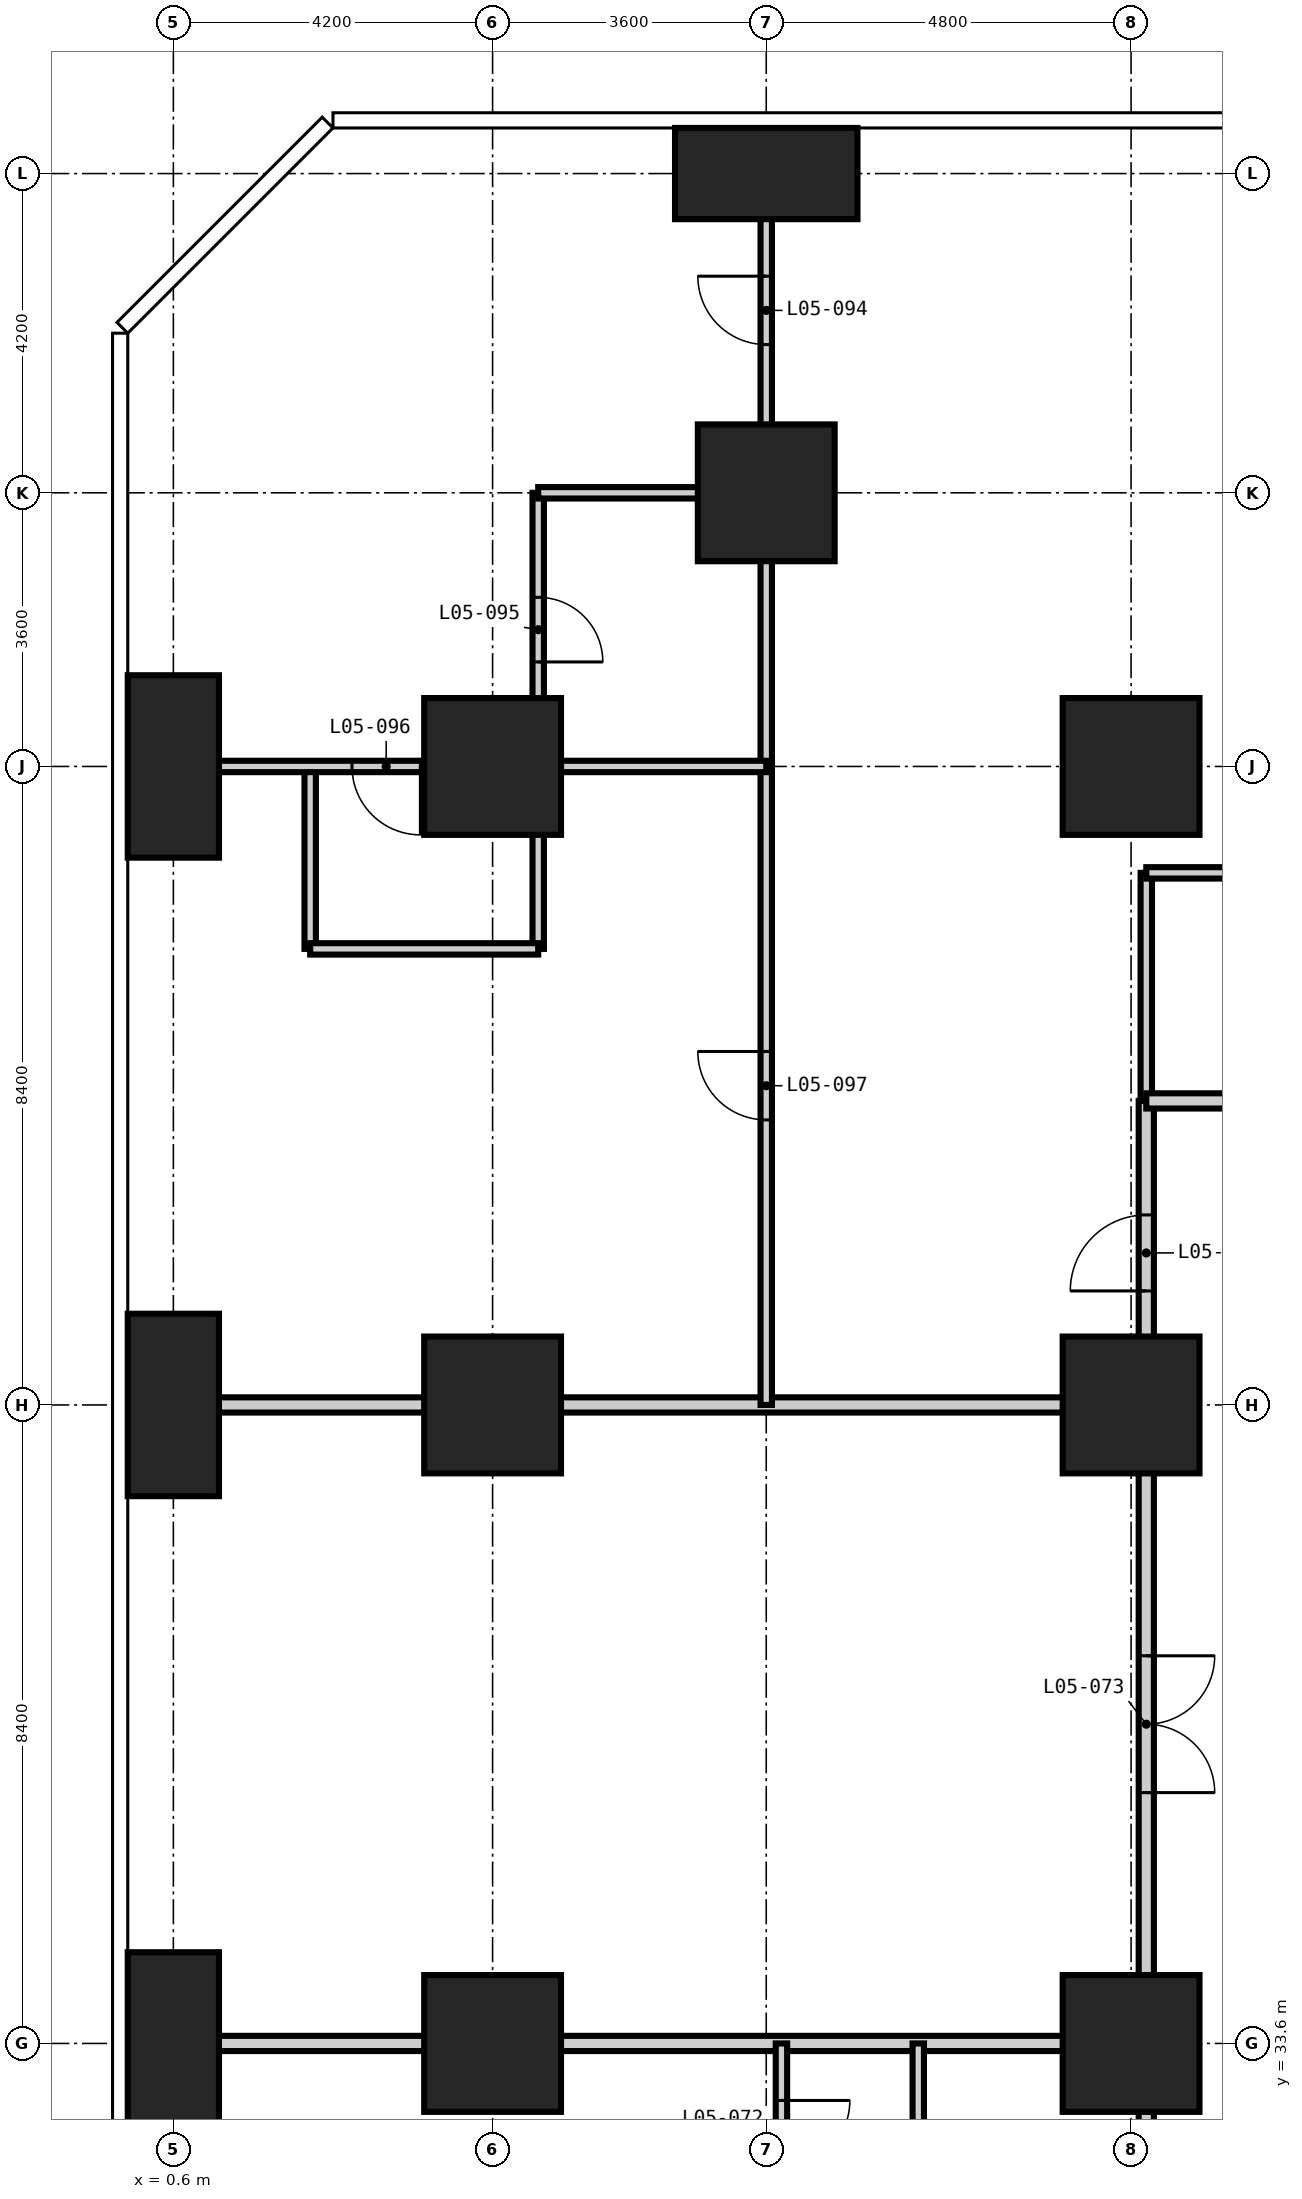
"""IFC4 building model, lengths in metres.
Left out: names, types, materials, properties, quantities, classifications, styles, units other than length and angle.
Written with IfcOpenShell. Run it as: python <this file> out.ifc"""

import sys

from ifc_helpers import new_model, si_unit, direction, frame, frame_2d, origin, origin_2d, place, context, subcontext, project, spatial, rectangle, extrude, element, fill, save


model = new_model("IFC4")
c1 = context("Model", 3, precision=1e-05, world=origin(), true_north=direction((0.0, 1.0)))
c2 = subcontext(c1, "Body", "Model", "MODEL_VIEW")
j1 = project(units=[si_unit("LENGTHUNIT", "METRE"), si_unit("PLANEANGLEUNIT", "RADIAN")], contexts=[c1])
p1 = place(None, origin())
s1 = spatial("IfcSite", under=j1, at=p1, CompositionType="ELEMENT")
p2 = place(p1, origin())
s2 = spatial("IfcBuilding", under=s1, at=p2, CompositionType="ELEMENT")
p3 = place(p2, frame((0.0, 0.0, 27.0)))
s3 = spatial("IfcBuildingStorey", under=s2, at=p3, CompositionType="ELEMENT", Elevation=27.0)
for number, where, z_axis, x_axis in (
    (1, (0.6, 33.6, -0.35), (0.0, 0.0, 1.0), (1.0, 0.0, 0.0)),
    (2, (0.6, 42.0, -0.35), (0.0, 0.0, 1.0), (1.0, 0.0, 0.0)),
    (3, (0.6, 50.4, -0.35), (0.0, 0.0, 1.0), (1.0, 0.0, 0.0)),
):
    element("IfcColumn", number, at=place(p3, frame(where, z_axis=z_axis, x_axis=x_axis)), inside=s3, PredefinedType="COLUMN", context=c2, shape_type="SweptSolid", body=[
        extrude(rectangle(XDim=1.2, YDim=2.4, at=origin_2d()), origin(), (0.0, 0.0, 1.0), 3.6),
    ])
for number, where, z_axis, x_axis in (
    (4, (4.8, 33.6, -0.35), (0.0, 0.0, 1.0), (1.0, 0.0, 0.0)),
    (5, (4.8, 42.0, -0.35), (0.0, 0.0, 1.0), (1.0, 0.0, 0.0)),
    (6, (4.8, 50.4, -0.35), (0.0, 0.0, 1.0), (1.0, 0.0, 0.0)),
    (7, (8.4, 54.0, -0.35), (0.0, 0.0, 1.0), (1.0, 0.0, 0.0)),
):
    element("IfcColumn", number, at=place(p3, frame(where, z_axis=z_axis, x_axis=x_axis)), inside=s3, PredefinedType="COLUMN", context=c2, shape_type="SweptSolid", body=[
        extrude(rectangle(XDim=1.8, YDim=1.8, at=origin_2d()), origin(), (0.0, 0.0, 1.0), 3.6),
    ])
p4 = place(p3, frame((8.4, 58.2, -0.35), z_axis=(0.0, 0.0, 1.0), x_axis=(1.0, 0.0, 0.0)))
e8 = element("IfcColumn", 8, at=p4, inside=s3, PredefinedType="COLUMN", context=c2, shape_type="SweptSolid", body=[
    extrude(rectangle(XDim=2.4, YDim=1.2, at=origin_2d()), origin(), (0.0, 0.0, 1.0), 3.6),
])
for number, where, z_axis, x_axis in (
    (9, (13.2, 33.6, -0.35), (0.0, 0.0, 1.0), (1.0, 0.0, 0.0)),
    (10, (13.2, 42.0, -0.35), (0.0, 0.0, 1.0), (1.0, 0.0, 0.0)),
    (11, (13.2, 50.4, -0.35), (0.0, 0.0, 1.0), (1.0, 0.0, 0.0)),
):
    element("IfcColumn", number, at=place(p3, frame(where, z_axis=z_axis, x_axis=x_axis)), inside=s3, PredefinedType="COLUMN", context=c2, shape_type="SweptSolid", body=[
        extrude(rectangle(XDim=1.8, YDim=1.8, at=origin_2d()), origin(), (0.0, 0.0, 1.0), 3.6),
    ])
p5 = place(p3, frame((5.4, 50.4, 0.0), z_axis=(0.0, 0.0, 1.0), x_axis=(0.0, 1.0, 0.0)))
e12 = element("IfcWall", 12, at=p5, inside=s3, PredefinedType="PARTITIONING", context=c2, shape_type="SweptSolid", body=[
    extrude(rectangle(XDim=3.6, YDim=0.15, at=frame_2d((1.8, 0.0))), origin(), (0.0, 0.0, 1.0), 3.25),
])
p6 = place(p5, frame((1.375, 0.0, 0.0)))
e13 = element("IfcOpeningElement", 13, at=p6, cuts=e12, PredefinedType="OPENING", context=c2, shape_type="SweptSolid", body=[
    extrude(rectangle(XDim=0.85, YDim=2.1, at=frame_2d((0.425, 1.05))), frame((0.0, 0.085, 0.0), z_axis=(0.0, -1.0, 0.0), x_axis=(1.0, 0.0, 0.0)), (0.0, 0.0, 1.0), 0.17),
])
p7 = place(p3, frame((13.4, 46.0, 0.0), z_axis=(0.0, 0.0, 1.0), x_axis=(0.0, 1.0, 0.0)))
e14 = element("IfcWall", 14, at=p7, inside=s3, PredefinedType="PARTITIONING", context=c2, shape_type="SweptSolid", body=[
    extrude(rectangle(XDim=3.0, YDim=0.15, at=frame_2d((1.5, 0.0))), origin(), (0.0, 0.0, 1.0), 3.25),
])
p8 = place(p3, frame((13.4, 49.0, 0.0), z_axis=(0.0, 0.0, 1.0), x_axis=(1.0, 0.0, 0.0)))
e15 = element("IfcWall", 15, at=p8, inside=s3, PredefinedType="PARTITIONING", context=c2, shape_type="SweptSolid", body=[
    extrude(rectangle(XDim=3.4, YDim=0.15, at=frame_2d((1.7, 0.0))), origin(), (0.0, 0.0, 1.0), 3.25),
])
p9 = place(p8, frame((1.275, 0.0, 0.0)))
e16 = element("IfcOpeningElement", 16, at=p9, cuts=e15, PredefinedType="OPENING", context=c2, shape_type="SweptSolid", body=[
    extrude(rectangle(XDim=0.85, YDim=2.1, at=frame_2d((0.425, 1.05))), frame((0.0, 0.085, 0.0), z_axis=(0.0, -1.0, 0.0), x_axis=(1.0, 0.0, 0.0)), (0.0, 0.0, 1.0), 0.17),
])
p10 = place(p3, frame((5.4, 54.0, 0.0), z_axis=(0.0, 0.0, 1.0), x_axis=(1.0, 0.0, 0.0)))
e17 = element("IfcWall", 17, at=p10, inside=s3, PredefinedType="PARTITIONING", context=c2, shape_type="SweptSolid", body=[
    extrude(rectangle(XDim=3.0, YDim=0.15, at=frame_2d((1.5, 0.0))), origin(), (0.0, 0.0, 1.0), 3.25),
])
p11 = place(p3, frame((13.4, 13.4, 0.0), z_axis=(0.0, 0.0, 1.0), x_axis=(0.0, 1.0, 0.0)))
e18 = element("IfcWall", 18, at=p11, inside=s3, PredefinedType="PARTITIONING", context=c2, shape_type="SweptSolid", body=[
    extrude(rectangle(XDim=20.2, YDim=0.2, at=frame_2d((10.1, 0.0))), origin(), (0.0, 0.0, 1.0), 3.25),
])
p12 = place(p11, frame((6.2, 0.0, 0.0)))
e19 = element("IfcOpeningElement", 19, at=p12, cuts=e18, PredefinedType="OPENING", context=c2, shape_type="SweptSolid", body=[
    extrude(rectangle(XDim=1.0, YDim=2.2, at=frame_2d((0.5, 1.1))), frame((0.0, 0.11, 0.0), z_axis=(0.0, -1.0, 0.0), x_axis=(1.0, 0.0, 0.0)), (0.0, 0.0, 1.0), 0.22),
])
p13 = place(p11, frame((8.0, 0.0, 0.0)))
e20 = element("IfcOpeningElement", 20, at=p13, cuts=e18, PredefinedType="OPENING", context=c2, shape_type="SweptSolid", body=[
    extrude(rectangle(XDim=1.0, YDim=2.2, at=frame_2d((0.5, 1.1))), frame((0.0, 0.11, 0.0), z_axis=(0.0, -1.0, 0.0), x_axis=(1.0, 0.0, 0.0)), (0.0, 0.0, 1.0), 0.22),
])
p14 = place(p11, frame((14.6, 0.0, 0.0)))
e21 = element("IfcOpeningElement", 21, at=p14, cuts=e18, PredefinedType="OPENING", context=c2, shape_type="SweptSolid", body=[
    extrude(rectangle(XDim=1.0, YDim=2.2, at=frame_2d((0.5, 1.1))), frame((0.0, 0.11, 0.0), z_axis=(0.0, -1.0, 0.0), x_axis=(1.0, 0.0, 0.0)), (0.0, 0.0, 1.0), 0.22),
])
p15 = place(p11, frame((16.4, 0.0, 0.0)))
e22 = element("IfcOpeningElement", 22, at=p15, cuts=e18, PredefinedType="OPENING", context=c2, shape_type="SweptSolid", body=[
    extrude(rectangle(XDim=1.0, YDim=2.2, at=frame_2d((0.5, 1.1))), frame((0.0, 0.11, 0.0), z_axis=(0.0, -1.0, 0.0), x_axis=(1.0, 0.0, 0.0)), (0.0, 0.0, 1.0), 0.22),
])
p16 = place(p11, frame((1.2, 0.0, 0.0)))
e23 = element("IfcOpeningElement", 23, at=p16, cuts=e18, PredefinedType="OPENING", context=c2, shape_type="SweptSolid", body=[
    extrude(rectangle(XDim=1.0, YDim=2.2, at=frame_2d((0.5, 1.1))), frame((0.0, 0.11, 0.0), z_axis=(0.0, -1.0, 0.0), x_axis=(1.0, 0.0, 0.0)), (0.0, 0.0, 1.0), 0.22),
])
p17 = place(p3, frame((13.4, 42.0, 0.0), z_axis=(0.0, 0.0, 1.0), x_axis=(0.0, 1.0, 0.0)))
e24 = element("IfcWall", 24, at=p17, inside=s3, PredefinedType="PARTITIONING", context=c2, shape_type="SweptSolid", body=[
    extrude(rectangle(XDim=4.0, YDim=0.2, at=frame_2d((2.0, 0.0))), origin(), (0.0, 0.0, 1.0), 3.25),
])
p18 = place(p17, frame((1.5, 0.0, 0.0)))
e25 = element("IfcOpeningElement", 25, at=p18, cuts=e24, PredefinedType="OPENING", context=c2, shape_type="SweptSolid", body=[
    extrude(rectangle(XDim=1.0, YDim=2.2, at=frame_2d((0.5, 1.1))), frame((0.0, 0.11, 0.0), z_axis=(0.0, -1.0, 0.0), x_axis=(1.0, 0.0, 0.0)), (0.0, 0.0, 1.0), 0.22),
])
p19 = place(p3, frame((13.4, 46.0, 0.0), z_axis=(0.0, 0.0, 1.0), x_axis=(1.0, 0.0, 0.0)))
e26 = element("IfcWall", 26, at=p19, inside=s3, PredefinedType="PARTITIONING", context=c2, shape_type="SweptSolid", body=[
    extrude(rectangle(XDim=32.3, YDim=0.2, at=frame_2d((16.15, 0.0))), origin(), (0.0, 0.0, 1.0), 3.25),
])
p20 = place(p19, frame((6.2, 0.0, 0.0)))
e27 = element("IfcOpeningElement", 27, at=p20, cuts=e26, PredefinedType="OPENING", context=c2, shape_type="SweptSolid", body=[
    extrude(rectangle(XDim=1.0, YDim=2.2, at=frame_2d((0.5, 1.1))), frame((0.0, 0.11, 0.0), z_axis=(0.0, -1.0, 0.0), x_axis=(1.0, 0.0, 0.0)), (0.0, 0.0, 1.0), 0.22),
])
p21 = place(p19, frame((8.0, 0.0, 0.0)))
e28 = element("IfcOpeningElement", 28, at=p21, cuts=e26, PredefinedType="OPENING", context=c2, shape_type="SweptSolid", body=[
    extrude(rectangle(XDim=1.0, YDim=2.2, at=frame_2d((0.5, 1.1))), frame((0.0, 0.11, 0.0), z_axis=(0.0, -1.0, 0.0), x_axis=(1.0, 0.0, 0.0)), (0.0, 0.0, 1.0), 0.22),
])
p22 = place(p19, frame((14.6, 0.0, 0.0)))
e29 = element("IfcOpeningElement", 29, at=p22, cuts=e26, PredefinedType="OPENING", context=c2, shape_type="SweptSolid", body=[
    extrude(rectangle(XDim=1.0, YDim=2.2, at=frame_2d((0.5, 1.1))), frame((0.0, 0.11, 0.0), z_axis=(0.0, -1.0, 0.0), x_axis=(1.0, 0.0, 0.0)), (0.0, 0.0, 1.0), 0.22),
])
p23 = place(p19, frame((16.4, 0.0, 0.0)))
e30 = element("IfcOpeningElement", 30, at=p23, cuts=e26, PredefinedType="OPENING", context=c2, shape_type="SweptSolid", body=[
    extrude(rectangle(XDim=1.0, YDim=2.2, at=frame_2d((0.5, 1.1))), frame((0.0, 0.11, 0.0), z_axis=(0.0, -1.0, 0.0), x_axis=(1.0, 0.0, 0.0)), (0.0, 0.0, 1.0), 0.22),
])
p24 = place(p19, frame((23.0, 0.0, 0.0)))
e31 = element("IfcOpeningElement", 31, at=p24, cuts=e26, PredefinedType="OPENING", context=c2, shape_type="SweptSolid", body=[
    extrude(rectangle(XDim=1.0, YDim=2.2, at=frame_2d((0.5, 1.1))), frame((0.0, 0.11, 0.0), z_axis=(0.0, -1.0, 0.0), x_axis=(1.0, 0.0, 0.0)), (0.0, 0.0, 1.0), 0.22),
])
p25 = place(p19, frame((24.8, 0.0, 0.0)))
e32 = element("IfcOpeningElement", 32, at=p25, cuts=e26, PredefinedType="OPENING", context=c2, shape_type="SweptSolid", body=[
    extrude(rectangle(XDim=1.0, YDim=2.2, at=frame_2d((0.5, 1.1))), frame((0.0, 0.11, 0.0), z_axis=(0.0, -1.0, 0.0), x_axis=(1.0, 0.0, 0.0)), (0.0, 0.0, 1.0), 0.22),
])
p26 = place(p3, frame((13.4, 42.0, 0.0), z_axis=(0.0, 0.0, 1.0), x_axis=(0.0, -1.0, 0.0)))
e33 = element("IfcWall", 33, at=p26, inside=s3, PredefinedType="PARTITIONING", context=c2, shape_type="SweptSolid", body=[
    extrude(rectangle(XDim=8.4, YDim=0.2, at=frame_2d((4.2, 0.0))), origin(), (0.0, 0.0, 1.0), 3.25),
])
p27 = place(p26, frame((3.3, 0.0, 0.0)))
e34 = element("IfcOpeningElement", 34, at=p27, cuts=e33, PredefinedType="OPENING", context=c2, shape_type="SweptSolid", body=[
    extrude(rectangle(XDim=1.8, YDim=2.4, at=frame_2d((0.9, 1.2))), frame((0.0, 0.11, 0.0), z_axis=(0.0, -1.0, 0.0), x_axis=(1.0, 0.0, 0.0)), (0.0, 0.0, 1.0), 0.22),
])
for number, where, z_axis, x_axis in (
    (35, (-0.008, 33.6, 0.0), (0.0, 0.0, 1.0), (1.0, 0.0, 0.0)),
    (36, (-0.008, 42.0, 0.0), (0.0, 0.0, 1.0), (1.0, 0.0, 0.0)),
):
    element("IfcWall", number, at=place(p3, frame(where, z_axis=z_axis, x_axis=x_axis)), inside=s3, PredefinedType="PARTITIONING", context=c2, shape_type="SweptSolid", body=[
        extrude(rectangle(XDim=13.408, YDim=0.2, at=frame_2d((6.704, 0.0))), origin(), (0.0, 0.0, 1.0), 3.25),
    ])
for number, where, z_axis, x_axis in (
    (37, (2.4, 48.0, 0.0), (0.0, 0.0, 1.0), (0.0, 1.0, 0.0)),
    (38, (5.4, 48.0, 0.0), (0.0, 0.0, 1.0), (0.0, 1.0, 0.0)),
):
    element("IfcWall", number, at=place(p3, frame(where, z_axis=z_axis, x_axis=x_axis)), inside=s3, PredefinedType="PARTITIONING", context=c2, shape_type="SweptSolid", body=[
        extrude(rectangle(XDim=2.4, YDim=0.15, at=frame_2d((1.2, 0.0))), origin(), (0.0, 0.0, 1.0), 3.25),
    ])
p28 = place(p3, frame((8.4, 42.0, 0.0), z_axis=(0.0, 0.0, 1.0), x_axis=(0.0, 1.0, 0.0)))
e39 = element("IfcWall", 39, at=p28, inside=s3, PredefinedType="PARTITIONING", context=c2, shape_type="SweptSolid", body=[
    extrude(rectangle(XDim=16.808, YDim=0.15, at=frame_2d((8.404, 0.0))), origin(), (0.0, 0.0, 1.0), 3.25),
])
p29 = place(p28, frame((13.95, 0.0, 0.0)))
e40 = element("IfcOpeningElement", 40, at=p29, cuts=e39, PredefinedType="OPENING", context=c2, shape_type="SweptSolid", body=[
    extrude(rectangle(XDim=0.9, YDim=2.1, at=frame_2d((0.45, 1.05))), frame((0.0, 0.085, 0.0), z_axis=(0.0, -1.0, 0.0), x_axis=(1.0, 0.0, 0.0)), (0.0, 0.0, 1.0), 0.17),
])
p30 = place(p28, frame((3.75, 0.0, 0.0)))
e41 = element("IfcOpeningElement", 41, at=p30, cuts=e39, PredefinedType="OPENING", context=c2, shape_type="SweptSolid", body=[
    extrude(rectangle(XDim=0.9, YDim=2.1, at=frame_2d((0.45, 1.05))), frame((0.0, 0.085, 0.0), z_axis=(0.0, -1.0, 0.0), x_axis=(1.0, 0.0, 0.0)), (0.0, 0.0, 1.0), 0.17),
])
p31 = place(p3, frame((8.6, 31.2, 0.0), z_axis=(0.0, 0.0, 1.0), x_axis=(0.0, 1.0, 0.0)))
e42 = element("IfcWall", 42, at=p31, inside=s3, PredefinedType="PARTITIONING", context=c2, shape_type="SweptSolid", body=[
    extrude(rectangle(XDim=2.4, YDim=0.15, at=frame_2d((1.2, 0.0))), origin(), (0.0, 0.0, 1.0), 3.25),
])
p32 = place(p31, frame((0.75, 0.0, 0.0)))
e43 = element("IfcOpeningElement", 43, at=p32, cuts=e42, PredefinedType="OPENING", context=c2, shape_type="SweptSolid", body=[
    extrude(rectangle(XDim=0.9, YDim=2.1, at=frame_2d((0.45, 1.05))), frame((0.0, 0.085, 0.0), z_axis=(0.0, -1.0, 0.0), x_axis=(1.0, 0.0, 0.0)), (0.0, 0.0, 1.0), 0.17),
])
p33 = place(p3, frame((10.4, 31.2, 0.0), z_axis=(0.0, 0.0, 1.0), x_axis=(0.0, 1.0, 0.0)))
e44 = element("IfcWall", 44, at=p33, inside=s3, PredefinedType="PARTITIONING", context=c2, shape_type="SweptSolid", body=[
    extrude(rectangle(XDim=2.4, YDim=0.15, at=frame_2d((1.2, 0.0))), origin(), (0.0, 0.0, 1.0), 3.25),
])
p34 = place(p3, frame((2.4, 48.0, 0.0), z_axis=(0.0, 0.0, 1.0), x_axis=(1.0, 0.0, 0.0)))
e45 = element("IfcWall", 45, at=p34, inside=s3, PredefinedType="PARTITIONING", context=c2, shape_type="SweptSolid", body=[
    extrude(rectangle(XDim=3.0, YDim=0.15, at=frame_2d((1.5, 0.0))), origin(), (0.0, 0.0, 1.0), 3.25),
])
p35 = place(p3, frame((-0.008, 50.4, 0.0), z_axis=(0.0, 0.0, 1.0), x_axis=(1.0, 0.0, 0.0)))
e46 = element("IfcWall", 46, at=p35, inside=s3, PredefinedType="PARTITIONING", context=c2, shape_type="SweptSolid", body=[
    extrude(rectangle(XDim=8.408, YDim=0.15, at=frame_2d((4.204, 0.0))), origin(), (0.0, 0.0, 1.0), 3.25),
])
p36 = place(p35, frame((2.958, 0.0, 0.0)))
e47 = element("IfcOpeningElement", 47, at=p36, cuts=e46, PredefinedType="OPENING", context=c2, shape_type="SweptSolid", body=[
    extrude(rectangle(XDim=0.9, YDim=2.1, at=frame_2d((0.45, 1.05))), frame((0.0, 0.085, 0.0), z_axis=(0.0, -1.0, 0.0), x_axis=(1.0, 0.0, 0.0)), (0.0, 0.0, 1.0), 0.17),
])
p37 = place(p32, frame((0.9, 0.0, 0.0), z_axis=(0.0, 0.0, 1.0), x_axis=(-1.0, 0.0, 0.0)))
e48 = element("IfcDoor", 48, at=p37, inside=s3, OperationType="SINGLE_SWING_LEFT", PredefinedType="DOOR", context=c2, shape_type="SweptSolid", body=[
    extrude(rectangle(XDim=0.9, YDim=2.1, at=frame_2d((0.45, 1.05))), frame((0.0, 0.025, 0.0), z_axis=(0.0, -1.0, 0.0), x_axis=(1.0, 0.0, 0.0)), (0.0, 0.0, 1.0), 0.05),
])
fill(e43, e48)
p38 = place(p27, origin())
e49 = element("IfcDoor", 49, at=p38, inside=s3, OperationType="DOUBLE_DOOR_DOUBLE_SWING", PredefinedType="DOOR", context=c2, shape_type="SweptSolid", body=[
    extrude(rectangle(XDim=1.8, YDim=2.4, at=frame_2d((0.9, 1.2))), frame((0.0, 0.025, 0.0), z_axis=(0.0, -1.0, 0.0), x_axis=(1.0, 0.0, 0.0)), (0.0, 0.0, 1.0), 0.05),
])
fill(e34, e49)
p39 = place(p18, origin())
e50 = element("IfcDoor", 50, at=p39, inside=s3, OperationType="SINGLE_SWING_LEFT", PredefinedType="DOOR", context=c2, shape_type="SweptSolid", body=[
    extrude(rectangle(XDim=1.0, YDim=2.2, at=frame_2d((0.5, 1.1))), frame((0.0, 0.025, 0.0), z_axis=(0.0, -1.0, 0.0), x_axis=(1.0, 0.0, 0.0)), (0.0, 0.0, 1.0), 0.05),
])
fill(e25, e50)
p40 = place(p29, origin())
e51 = element("IfcDoor", 51, at=p40, inside=s3, OperationType="SINGLE_SWING_RIGHT", PredefinedType="DOOR", context=c2, shape_type="SweptSolid", body=[
    extrude(rectangle(XDim=0.9, YDim=2.1, at=frame_2d((0.45, 1.05))), frame((0.0, 0.025, 0.0), z_axis=(0.0, -1.0, 0.0), x_axis=(1.0, 0.0, 0.0)), (0.0, 0.0, 1.0), 0.05),
])
fill(e40, e51)
p41 = place(p6, frame((0.85, 0.0, 0.0), z_axis=(0.0, 0.0, 1.0), x_axis=(-1.0, 0.0, 0.0)))
e52 = element("IfcDoor", 52, at=p41, inside=s3, OperationType="SINGLE_SWING_RIGHT", PredefinedType="DOOR", context=c2, shape_type="SweptSolid", body=[
    extrude(rectangle(XDim=0.85, YDim=2.1, at=frame_2d((0.425, 1.05))), frame((0.0, 0.025, 0.0), z_axis=(0.0, -1.0, 0.0), x_axis=(1.0, 0.0, 0.0)), (0.0, 0.0, 1.0), 0.05),
])
fill(e13, e52)
p42 = place(p36, frame((0.9, 0.0, 0.0), z_axis=(0.0, 0.0, 1.0), x_axis=(-1.0, 0.0, 0.0)))
e53 = element("IfcDoor", 53, at=p42, inside=s3, OperationType="SINGLE_SWING_LEFT", PredefinedType="DOOR", context=c2, shape_type="SweptSolid", body=[
    extrude(rectangle(XDim=0.9, YDim=2.1, at=frame_2d((0.45, 1.05))), frame((0.0, 0.025, 0.0), z_axis=(0.0, -1.0, 0.0), x_axis=(1.0, 0.0, 0.0)), (0.0, 0.0, 1.0), 0.05),
])
fill(e47, e53)
p43 = place(p30, origin())
e54 = element("IfcDoor", 54, at=p43, inside=s3, OperationType="SINGLE_SWING_RIGHT", PredefinedType="DOOR", context=c2, shape_type="SweptSolid", body=[
    extrude(rectangle(XDim=0.9, YDim=2.1, at=frame_2d((0.45, 1.05))), frame((0.0, 0.025, 0.0), z_axis=(0.0, -1.0, 0.0), x_axis=(1.0, 0.0, 0.0)), (0.0, 0.0, 1.0), 0.05),
])
fill(e41, e54)
save(model, sys.argv[1])
